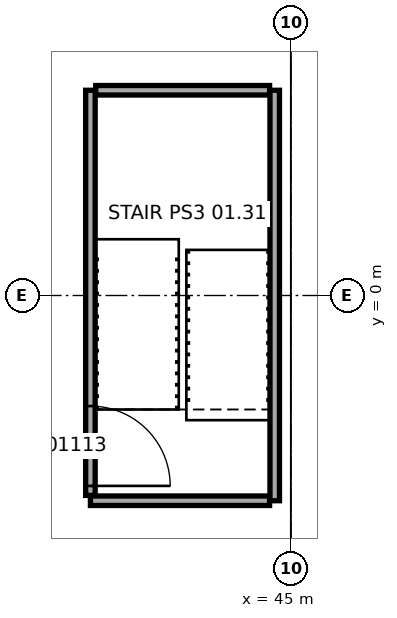
"""IFC4 building model, lengths in metres.
Left out: names, types, materials, properties, quantities, classifications, styles, units other than length and angle.
Written with IfcOpenShell. Run it as: python <this file> out.ifc"""

import sys

from ifc_helpers import new_model, si_unit, direction, frame, frame_2d, origin, place, context, subcontext, project, spatial, rectangle, extrude, element, fill, save


model = new_model("IFC4")
c1 = context("Model", 3, precision=1e-05, world=origin(), true_north=direction((0.0, 1.0)))
c2 = subcontext(c1, "Body", "Model", "MODEL_VIEW")
j1 = project(units=[si_unit("LENGTHUNIT", "METRE"), si_unit("PLANEANGLEUNIT", "RADIAN")], contexts=[c1])
p1 = place(None, origin())
s1 = spatial("IfcSite", under=j1, at=p1, CompositionType="ELEMENT")
p2 = place(p1, origin())
s2 = spatial("IfcBuilding", under=s1, at=p2, CompositionType="ELEMENT")
p3 = place(p2, frame((0.0, 0.0, 7.5)))
s3 = spatial("IfcBuildingStorey", under=s2, at=p3, CompositionType="ELEMENT", Elevation=7.5)
p4 = place(p3, frame((44.44, -5.4, 0.0), z_axis=(0.0, 0.0, 1.0), x_axis=(-1.0, 0.0, 0.0)))
e1 = element("IfcWall", 1, at=p4, inside=s3, PredefinedType="SOLIDWALL", context=c2, shape_type="SweptSolid", body=[
    extrude(rectangle(XDim=4.715, YDim=0.25, at=frame_2d((2.357, 0.0))), origin(), (0.0, 0.0, 1.0), 5.2),
])
p5 = place(p3, frame((39.725, -5.26, 0.0), z_axis=(0.0, 0.0, 1.0), x_axis=(0.0, 1.0, 0.0)))
e2 = element("IfcWall", 2, at=p5, inside=s3, PredefinedType="SOLIDWALL", context=c2, shape_type="SweptSolid", body=[
    extrude(rectangle(XDim=10.66, YDim=0.25, at=frame_2d((5.33, 0.0))), origin(), (0.0, 0.0, 1.0), 5.2),
])
p6 = place(p5, frame((0.25, 0.0, 0.0)))
e3 = element("IfcOpeningElement", 3, at=p6, cuts=e2, PredefinedType="OPENING", context=c2, shape_type="SweptSolid", body=[
    extrude(rectangle(XDim=2.1, YDim=2.4, at=frame_2d((1.05, 1.2))), frame((0.0, 0.135, 0.0), z_axis=(0.0, -1.0, 0.0), x_axis=(1.0, 0.0, 0.0)), (0.0, 0.0, 1.0), 0.27),
])
p7 = place(p3, frame((39.865, 5.4, 0.0), z_axis=(0.0, 0.0, 1.0), x_axis=(1.0, 0.0, 0.0)))
e4 = element("IfcWall", 4, at=p7, inside=s3, PredefinedType="SOLIDWALL", context=c2, shape_type="SweptSolid", body=[
    extrude(rectangle(XDim=4.575, YDim=0.25, at=frame_2d((2.288, 0.0))), origin(), (0.0, 0.0, 1.0), 5.2),
])
p8 = place(p3, frame((44.575, 5.4, 0.0), z_axis=(0.0, 0.0, 1.0), x_axis=(0.0, -1.0, 0.0)))
e5 = element("IfcWall", 5, at=p8, inside=s3, PredefinedType="SOLIDWALL", context=c2, shape_type="SweptSolid", body=[
    extrude(rectangle(XDim=10.8, YDim=0.25, at=frame_2d((5.4, 0.0))), origin(), (0.0, 0.0, 1.0), 5.2),
])
p9 = place(p6, frame((2.1, 0.0, 0.0), z_axis=(0.0, 0.0, 1.0), x_axis=(-1.0, 0.0, 0.0)))
e6 = element("IfcDoor", 6, at=p9, inside=s3, OperationType="DOUBLE_DOOR_SINGLE_SWING", PredefinedType="DOOR", context=c2, shape_type="SweptSolid", body=[
    extrude(rectangle(XDim=2.1, YDim=2.4, at=frame_2d((1.05, 1.2))), frame((0.0, 0.025, 0.0), z_axis=(0.0, -1.0, 0.0), x_axis=(1.0, 0.0, 0.0)), (0.0, 0.0, 1.0), 0.05),
])
fill(e3, e6)
save(model, sys.argv[1])
